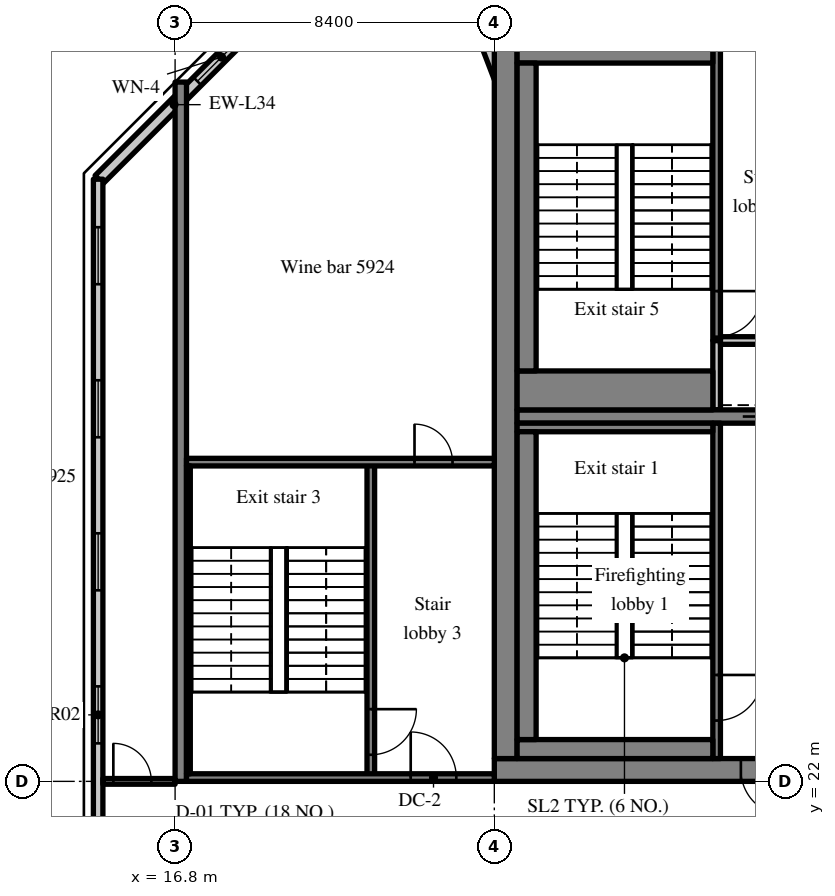
"""IFC4 building model, lengths in metres.
Left out: names, types, materials, properties, quantities, classifications, styles, units other than length and angle.
Written with IfcOpenShell. Run it as: python <this file> out.ifc"""

import sys

from ifc_helpers import new_model, si_unit, direction, frame, frame_2d, origin, place, context, subcontext, project, spatial, rectangle, extrude, source, transform, mapped, element, fill, save


model = new_model("IFC4")
c1 = context("Model", 3, precision=1e-05, world=origin(), true_north=direction((0.0, 1.0)))
c2 = subcontext(c1, "Body", "Model", "MODEL_VIEW")
j1 = project(units=[si_unit("LENGTHUNIT", "METRE"), si_unit("PLANEANGLEUNIT", "RADIAN")], contexts=[c1])
p1 = place(None, origin())
s1 = spatial("IfcSite", under=j1, at=p1, CompositionType="ELEMENT")
p2 = place(p1, origin())
s2 = spatial("IfcBuilding", under=s1, at=p2, CompositionType="ELEMENT")
p3 = place(p2, frame((0.0, 0.0, 245.2)))
s3 = spatial("IfcBuildingStorey", under=s2, at=p3, CompositionType="ELEMENT", Elevation=245.2)
m1 = source(origin(), c2, "Body", "SweptSolid", [
    extrude(rectangle(XDim=50.4, YDim=0.6, at=frame_2d((25.2, 0.0))), origin(), (0.0, 0.0, 1.0), 3.62),
])
p4 = place(p3, frame((25.2, 22.3, 0.0), z_axis=(0.0, 0.0, 1.0), x_axis=(1.0, 0.0, 0.0)))
e1 = element("IfcWall", 1, at=p4, inside=s3, PredefinedType="SHEAR", context=c2, shape_type="MappedRepresentation", body=[
    mapped(m1, transform((0.0, 0.0, 0.0), scale=1.0)),
])
m2 = source(origin(), c2, "Body", "SweptSolid", [
    extrude(rectangle(XDim=1.8, YDim=2.1, at=frame_2d((0.9, 1.05))), frame((0.0, 0.31, 0.0), z_axis=(0.0, -1.0, 0.0), x_axis=(1.0, 0.0, 0.0)), (0.0, 0.0, 1.0), 0.62),
])
p5 = place(p4, frame((15.9, 0.0, 0.0)))
e2 = element("IfcOpeningElement", 2, at=p5, cuts=e1, PredefinedType="OPENING", context=c2, shape_type="MappedRepresentation", body=[
    mapped(m2, transform((0.0, 0.0, 0.0), scale=1.0)),
])
m3 = source(origin(), c2, "Body", "SweptSolid", [
    extrude(rectangle(XDim=0.9, YDim=2.1, at=frame_2d((0.45, 1.05))), frame((0.0, 0.31, 0.0), z_axis=(0.0, -1.0, 0.0), x_axis=(1.0, 0.0, 0.0)), (0.0, 0.0, 1.0), 0.62),
])
p6 = place(p4, frame((9.687, 0.0, 0.0)))
e3 = element("IfcOpeningElement", 3, at=p6, cuts=e1, PredefinedType="OPENING", context=c2, shape_type="MappedRepresentation", body=[
    mapped(m3, transform((0.0, 0.0, 0.0), scale=1.0)),
])
p7 = place(p4, frame((21.513, 0.0, 0.0)))
e4 = element("IfcOpeningElement", 4, at=p7, cuts=e1, PredefinedType="OPENING", context=c2, shape_type="MappedRepresentation", body=[
    mapped(m3, transform((0.0, 0.0, 0.0), scale=1.0)),
])
p8 = place(p4, frame((32.7, 0.0, 0.0)))
e5 = element("IfcOpeningElement", 5, at=p8, cuts=e1, PredefinedType="OPENING", context=c2, shape_type="MappedRepresentation", body=[
    mapped(m2, transform((0.0, 0.0, 0.0), scale=1.0)),
])
m4 = source(origin(), c2, "Body", "SweptSolid", [
    extrude(rectangle(XDim=1.2, YDim=2.1, at=frame_2d((0.6, 1.05))), frame((0.0, 0.31, 0.0), z_axis=(0.0, -1.0, 0.0), x_axis=(1.0, 0.0, 0.0)), (0.0, 0.0, 1.0), 0.62),
])
p9 = place(p4, frame((6.488, 0.0, 0.0)))
e6 = element("IfcOpeningElement", 6, at=p9, cuts=e1, PredefinedType="OPENING", context=c2, shape_type="MappedRepresentation", body=[
    mapped(m4, transform((0.0, 0.0, 0.0), scale=1.0)),
])
p10 = place(p4, frame((47.925, 0.0, 0.0)))
e7 = element("IfcOpeningElement", 7, at=p10, cuts=e1, PredefinedType="OPENING", context=c2, shape_type="MappedRepresentation", body=[
    mapped(m4, transform((0.0, 0.0, 0.0), scale=1.0)),
])
m5 = source(origin(), c2, "Body", "SweptSolid", [
    extrude(rectangle(XDim=18.8, YDim=0.6, at=frame_2d((9.4, 0.0))), origin(), (0.0, 0.0, 1.0), 3.62),
])
p11 = place(p3, frame((25.5, 22.6, 0.0), z_axis=(0.0, 0.0, 1.0), x_axis=(0.0, 1.0, 0.0)))
e8 = element("IfcWall", 8, at=p11, inside=s3, PredefinedType="SHEAR", context=c2, shape_type="MappedRepresentation", body=[
    mapped(m5, transform((0.0, 0.0, 0.0), scale=1.0)),
])
m6 = source(origin(), c2, "Body", "SweptSolid", [
    extrude(rectangle(XDim=7.625, YDim=0.35, at=frame_2d((3.812, 0.0))), origin(), (0.0, 0.0, 1.0), 3.62),
])
p12 = place(p3, frame((25.8, 31.6, 0.0), z_axis=(0.0, 0.0, 1.0), x_axis=(1.0, 0.0, 0.0)))
e9 = element("IfcWall", 9, at=p12, inside=s3, PredefinedType="SHEAR", context=c2, shape_type="MappedRepresentation", body=[
    mapped(m6, transform((0.0, 0.0, 0.0), scale=1.0)),
])
m7 = source(origin(), c2, "Body", "SweptSolid", [
    extrude(rectangle(XDim=1.1, YDim=2.1, at=frame_2d((0.55, 1.05))), frame((0.0, 0.185, 0.0), z_axis=(0.0, -1.0, 0.0), x_axis=(1.0, 0.0, 0.0)), (0.0, 0.0, 1.0), 0.37),
])
p13 = place(p12, frame((5.938, 0.0, 0.0)))
e10 = element("IfcOpeningElement", 10, at=p13, cuts=e9, PredefinedType="OPENING", context=c2, shape_type="MappedRepresentation", body=[
    mapped(m7, transform((0.0, 0.0, 0.0), scale=1.0)),
])
m8 = source(origin(), c2, "Body", "SweptSolid", [
    extrude(rectangle(XDim=18.4, YDim=0.3, at=frame_2d((9.2, 0.0))), origin(), (0.0, 0.0, 1.0), 3.62),
])
p14 = place(p3, frame((16.95, 22.0, 0.0), z_axis=(0.0, 0.0, 1.0), x_axis=(0.0, 1.0, 0.0)))
e11 = element("IfcWall", 11, at=p14, inside=s3, PredefinedType="SHEAR", context=c2, shape_type="MappedRepresentation", body=[
    mapped(m8, transform((0.0, 0.0, 0.0), scale=1.0)),
])
m9 = source(origin(), c2, "Body", "SweptSolid", [
    extrude(rectangle(XDim=3.559, YDim=0.3, at=frame_2d((1.78, 0.0))), origin(), (0.0, 0.0, 1.0), 3.62),
])
p15 = place(p3, frame((25.55, 39.969, 0.0), z_axis=(0.0, 0.0, 1.0), x_axis=(-0.35779745313, 0.933799219604, 0.0)))
e12 = element("IfcWall", 12, at=p15, inside=s3, PredefinedType="SOLIDWALL", context=c2, shape_type="MappedRepresentation", body=[
    mapped(m9, transform((0.0, 0.0, 0.0), scale=1.0)),
])
m10 = source(origin(), c2, "Body", "SweptSolid", [
    extrude(rectangle(XDim=1.5, YDim=2.0, at=frame_2d((0.75, 1.0))), frame((0.0, 0.16, 0.0), z_axis=(0.0, -1.0, 0.0), x_axis=(1.0, 0.0, 0.0)), (0.0, 0.0, 1.0), 0.32),
])
p16 = place(p15, frame((1.903, 0.0, 0.9)))
e13 = element("IfcOpeningElement", 13, at=p16, cuts=e12, PredefinedType="OPENING", context=c2, shape_type="MappedRepresentation", body=[
    mapped(m10, transform((0.0, 0.0, 0.0), scale=1.0)),
])
m11 = source(origin(), c2, "Body", "SweptSolid", [
    extrude(rectangle(XDim=5.576, YDim=0.3, at=frame_2d((2.788, 0.0))), origin(), (0.0, 0.0, 1.0), 3.62),
])
p17 = place(p3, frame((18.743, 41.777, 0.0), z_axis=(0.0, 0.0, 1.0), x_axis=(-0.707106781187, -0.707106781187, 0.0)))
e14 = element("IfcWall", 14, at=p17, inside=s3, PredefinedType="SOLIDWALL", context=c2, shape_type="MappedRepresentation", body=[
    mapped(m11, transform((0.0, 0.0, 0.0), scale=1.0)),
])
m12 = source(origin(), c2, "Body", "SweptSolid", [
    extrude(rectangle(XDim=1.8, YDim=1.5, at=frame_2d((0.9, 0.75))), frame((0.0, 0.16, 0.0), z_axis=(0.0, -1.0, 0.0), x_axis=(1.0, 0.0, 0.0)), (0.0, 0.0, 1.0), 0.32),
])
p18 = place(p17, frame((0.118, 0.0, 0.9)))
e15 = element("IfcOpeningElement", 15, at=p18, cuts=e14, PredefinedType="OPENING", context=c2, shape_type="MappedRepresentation", body=[
    mapped(m12, transform((0.0, 0.0, 0.0), scale=1.0)),
])
m13 = source(origin(), c2, "Body", "SweptSolid", [
    extrude(rectangle(XDim=28.189, YDim=0.25, at=frame_2d((14.095, 0.0))), origin(), (0.0, 0.0, 1.0), 3.62),
])
p19 = place(p3, frame((14.775, 37.845, 0.0), z_axis=(0.0, 0.0, 1.0), x_axis=(0.0, -1.0, 0.0)))
e16 = element("IfcWall", 16, at=p19, inside=s3, PredefinedType="SOLIDWALL", context=c2, shape_type="MappedRepresentation", body=[
    mapped(m13, transform((0.0, 0.0, 0.0), scale=1.0)),
])
m14 = source(origin(), c2, "Body", "SweptSolid", [
    extrude(rectangle(XDim=1.5, YDim=1.5, at=frame_2d((0.75, 0.75))), frame((0.0, 0.135, 0.0), z_axis=(0.0, -1.0, 0.0), x_axis=(1.0, 0.0, 0.0)), (0.0, 0.0, 1.0), 0.27),
])
p20 = place(p19, frame((1.263, 0.0, 0.9)))
e17 = element("IfcOpeningElement", 17, at=p20, cuts=e16, PredefinedType="OPENING", context=c2, shape_type="MappedRepresentation", body=[
    mapped(m14, transform((0.0, 0.0, 0.0), scale=1.0)),
])
p21 = place(p19, frame((5.291, 0.0, 0.9)))
e18 = element("IfcOpeningElement", 18, at=p21, cuts=e16, PredefinedType="OPENING", context=c2, shape_type="MappedRepresentation", body=[
    mapped(m14, transform((0.0, 0.0, 0.0), scale=1.0)),
])
p22 = place(p19, frame((9.318, 0.0, 0.9)))
e19 = element("IfcOpeningElement", 19, at=p22, cuts=e16, PredefinedType="OPENING", context=c2, shape_type="MappedRepresentation", body=[
    mapped(m14, transform((0.0, 0.0, 0.0), scale=1.0)),
])
p23 = place(p19, frame((13.345, 0.0, 0.9)))
e20 = element("IfcOpeningElement", 20, at=p23, cuts=e16, PredefinedType="OPENING", context=c2, shape_type="MappedRepresentation", body=[
    mapped(m14, transform((0.0, 0.0, 0.0), scale=1.0)),
])
p24 = place(p19, frame((17.372, 0.0, 0.9)))
e21 = element("IfcOpeningElement", 21, at=p24, cuts=e16, PredefinedType="OPENING", context=c2, shape_type="MappedRepresentation", body=[
    mapped(m14, transform((0.0, 0.0, 0.0), scale=1.0)),
])
p25 = place(p19, frame((21.399, 0.0, 0.9)))
e22 = element("IfcOpeningElement", 22, at=p25, cuts=e16, PredefinedType="OPENING", context=c2, shape_type="MappedRepresentation", body=[
    mapped(m14, transform((0.0, 0.0, 0.0), scale=1.0)),
])
p26 = place(p19, frame((25.426, 0.0, 0.9)))
e23 = element("IfcOpeningElement", 23, at=p26, cuts=e16, PredefinedType="OPENING", context=c2, shape_type="MappedRepresentation", body=[
    mapped(m14, transform((0.0, 0.0, 0.0), scale=1.0)),
])
m15 = source(origin(), c2, "Body", "SweptSolid", [
    extrude(rectangle(XDim=8.825, YDim=0.2, at=frame_2d((4.413, 0.0))), origin(), (0.0, 0.0, 1.0), 3.62),
])
p27 = place(p3, frame((31.05, 22.6, 0.0), z_axis=(0.0, 0.0, 1.0), x_axis=(0.0, 1.0, 0.0)))
e24 = element("IfcWall", 24, at=p27, inside=s3, PredefinedType="SOLIDWALL", context=c2, shape_type="MappedRepresentation", body=[
    mapped(m15, transform((0.0, 0.0, 0.0), scale=1.0)),
])
m16 = source(origin(), c2, "Body", "SweptSolid", [
    extrude(rectangle(XDim=1.2, YDim=2.1, at=frame_2d((0.6, 1.05))), frame((0.0, 0.11, 0.0), z_axis=(0.0, -1.0, 0.0), x_axis=(1.0, 0.0, 0.0)), (0.0, 0.0, 1.0), 0.22),
])
p28 = place(p27, frame((1.0, 0.0, 0.0)))
e25 = element("IfcOpeningElement", 25, at=p28, cuts=e24, PredefinedType="OPENING", context=c2, shape_type="MappedRepresentation", body=[
    mapped(m16, transform((0.0, 0.0, 0.0), scale=1.0)),
])
m17 = source(origin(), c2, "Body", "SweptSolid", [
    extrude(rectangle(XDim=1.825, YDim=0.2, at=frame_2d((0.913, 0.0))), origin(), (0.0, 0.0, 1.0), 3.62),
])
p29 = place(p3, frame((31.05, 31.775, 0.0), z_axis=(0.0, 0.0, 1.0), x_axis=(0.0, 1.0, 0.0)))
e26 = element("IfcWall", 26, at=p29, inside=s3, PredefinedType="SOLIDWALL", context=c2, shape_type="MappedRepresentation", body=[
    mapped(m17, transform((0.0, 0.0, 0.0), scale=1.0)),
])
m18 = source(origin(), c2, "Body", "SweptSolid", [
    extrude(rectangle(XDim=2.275, YDim=0.2, at=frame_2d((1.138, 0.0))), origin(), (0.0, 0.0, 1.0), 3.62),
])
p30 = place(p3, frame((31.15, 33.6, 0.0), z_axis=(0.0, 0.0, 1.0), x_axis=(1.0, 0.0, 0.0)))
e27 = element("IfcWall", 27, at=p30, inside=s3, PredefinedType="SOLIDWALL", context=c2, shape_type="MappedRepresentation", body=[
    mapped(m18, transform((0.0, 0.0, 0.0), scale=1.0)),
])
m19 = source(origin(), c2, "Body", "SweptSolid", [
    extrude(rectangle(XDim=7.8, YDim=0.2, at=frame_2d((3.9, 0.0))), origin(), (0.0, 0.0, 1.0), 3.62),
])
p31 = place(p3, frame((31.05, 33.6, 0.0), z_axis=(0.0, 0.0, 1.0), x_axis=(0.0, 1.0, 0.0)))
e28 = element("IfcWall", 28, at=p31, inside=s3, PredefinedType="SOLIDWALL", context=c2, shape_type="MappedRepresentation", body=[
    mapped(m19, transform((0.0, 0.0, 0.0), scale=1.0)),
])
p32 = place(p31, frame((0.1, 0.0, 0.0)))
e29 = element("IfcOpeningElement", 29, at=p32, cuts=e28, PredefinedType="OPENING", context=c2, shape_type="MappedRepresentation", body=[
    mapped(m16, transform((0.0, 0.0, 0.0), scale=1.0)),
])
m20 = source(origin(), c2, "Body", "SweptSolid", [
    extrude(rectangle(XDim=8.3, YDim=0.2, at=frame_2d((4.15, 0.0))), origin(), (0.0, 0.0, 1.0), 3.62),
])
p33 = place(p3, frame((21.95, 22.1, 0.0), z_axis=(0.0, 0.0, 1.0), x_axis=(0.0, 1.0, 0.0)))
e30 = element("IfcWall", 30, at=p33, inside=s3, PredefinedType="SOLIDWALL", context=c2, shape_type="MappedRepresentation", body=[
    mapped(m20, transform((0.0, 0.0, 0.0), scale=1.0)),
])
p34 = place(p33, frame((0.6, 0.0, 0.0)))
e31 = element("IfcOpeningElement", 31, at=p34, cuts=e30, PredefinedType="OPENING", context=c2, shape_type="MappedRepresentation", body=[
    mapped(m16, transform((0.0, 0.0, 0.0), scale=1.0)),
])
m21 = source(origin(), c2, "Body", "SweptSolid", [
    extrude(rectangle(XDim=8.1, YDim=0.2, at=frame_2d((4.05, 0.0))), origin(), (0.0, 0.0, 1.0), 3.62),
])
p35 = place(p3, frame((17.1, 22.1, 0.0), z_axis=(0.0, 0.0, 1.0), x_axis=(1.0, 0.0, 0.0)))
e32 = element("IfcWall", 32, at=p35, inside=s3, PredefinedType="SOLIDWALL", context=c2, shape_type="MappedRepresentation", body=[
    mapped(m21, transform((0.0, 0.0, 0.0), scale=1.0)),
])
p36 = place(p35, frame((5.9, 0.0, 0.0)))
e33 = element("IfcOpeningElement", 33, at=p36, cuts=e32, PredefinedType="OPENING", context=c2, shape_type="MappedRepresentation", body=[
    mapped(m16, transform((0.0, 0.0, 0.0), scale=1.0)),
])
p37 = place(p3, frame((17.1, 30.4, 0.0), z_axis=(0.0, 0.0, 1.0), x_axis=(1.0, 0.0, 0.0)))
e34 = element("IfcWall", 34, at=p37, inside=s3, PredefinedType="SOLIDWALL", context=c2, shape_type="MappedRepresentation", body=[
    mapped(m21, transform((0.0, 0.0, 0.0), scale=1.0)),
])
m22 = source(origin(), c2, "Body", "SweptSolid", [
    extrude(rectangle(XDim=1.0, YDim=2.1, at=frame_2d((0.5, 1.05))), frame((0.0, 0.11, 0.0), z_axis=(0.0, -1.0, 0.0), x_axis=(1.0, 0.0, 0.0)), (0.0, 0.0, 1.0), 0.22),
])
p38 = place(p37, frame((6.0, 0.0, 0.0)))
e35 = element("IfcOpeningElement", 35, at=p38, cuts=e34, PredefinedType="OPENING", context=c2, shape_type="MappedRepresentation", body=[
    mapped(m22, transform((0.0, 0.0, 0.0), scale=1.0)),
])
m23 = source(origin(), c2, "Body", "SweptSolid", [
    extrude(rectangle(XDim=5.15, YDim=0.5, at=frame_2d((2.575, 0.0))), origin(), (0.0, 0.0, 1.0), 3.62),
])
p39 = place(p3, frame((25.8, 22.85, 0.0), z_axis=(0.0, 0.0, 1.0), x_axis=(1.0, 0.0, 0.0)))
e36 = element("IfcWall", 36, at=p39, inside=s3, PredefinedType="SOLIDWALL", context=c2, shape_type="MappedRepresentation", body=[
    mapped(m23, transform((0.0, 0.0, 0.0), scale=1.0)),
])
m24 = source(origin(), c2, "Body", "SweptSolid", [
    extrude(rectangle(XDim=5.15, YDim=0.225, at=frame_2d((2.575, 0.0))), origin(), (0.0, 0.0, 1.0), 3.62),
])
p40 = place(p3, frame((25.8, 31.312, 0.0), z_axis=(0.0, 0.0, 1.0), x_axis=(1.0, 0.0, 0.0)))
e37 = element("IfcWall", 37, at=p40, inside=s3, PredefinedType="SOLIDWALL", context=c2, shape_type="MappedRepresentation", body=[
    mapped(m24, transform((0.0, 0.0, 0.0), scale=1.0)),
])
m25 = source(origin(), c2, "Body", "SweptSolid", [
    extrude(rectangle(XDim=8.1, YDim=0.5, at=frame_2d((4.05, 0.0))), origin(), (0.0, 0.0, 1.0), 3.62),
])
p41 = place(p3, frame((26.05, 23.1, 0.0), z_axis=(0.0, 0.0, 1.0), x_axis=(0.0, 1.0, 0.0)))
e38 = element("IfcWall", 38, at=p41, inside=s3, PredefinedType="SOLIDWALL", context=c2, shape_type="MappedRepresentation", body=[
    mapped(m25, transform((0.0, 0.0, 0.0), scale=1.0)),
])
m26 = source(origin(), c2, "Body", "SweptSolid", [
    extrude(rectangle(XDim=8.1, YDim=0.1, at=frame_2d((4.05, 0.0))), origin(), (0.0, 0.0, 1.0), 3.62),
])
p42 = place(p3, frame((17.15, 22.2, 0.0), z_axis=(0.0, 0.0, 1.0), x_axis=(0.0, 1.0, 0.0)))
e39 = element("IfcWall", 39, at=p42, inside=s3, PredefinedType="SOLIDWALL", context=c2, shape_type="MappedRepresentation", body=[
    mapped(m26, transform((0.0, 0.0, 0.0), scale=1.0)),
])
p43 = place(p3, frame((25.8, 41.15, 0.0), z_axis=(0.0, 0.0, 1.0), x_axis=(1.0, 0.0, 0.0)))
e40 = element("IfcWall", 40, at=p43, inside=s3, PredefinedType="SOLIDWALL", context=c2, shape_type="MappedRepresentation", body=[
    mapped(m23, transform((0.0, 0.0, 0.0), scale=1.0)),
])
m27 = source(origin(), c2, "Body", "SweptSolid", [
    extrude(rectangle(XDim=5.15, YDim=1.025, at=frame_2d((2.575, 0.0))), origin(), (0.0, 0.0, 1.0), 3.62),
])
p44 = place(p3, frame((25.8, 32.287, 0.0), z_axis=(0.0, 0.0, 1.0), x_axis=(1.0, 0.0, 0.0)))
e41 = element("IfcWall", 41, at=p44, inside=s3, PredefinedType="SOLIDWALL", context=c2, shape_type="MappedRepresentation", body=[
    mapped(m27, transform((0.0, 0.0, 0.0), scale=1.0)),
])
p45 = place(p3, frame((26.05, 32.8, 0.0), z_axis=(0.0, 0.0, 1.0), x_axis=(0.0, 1.0, 0.0)))
e42 = element("IfcWall", 42, at=p45, inside=s3, PredefinedType="SOLIDWALL", context=c2, shape_type="MappedRepresentation", body=[
    mapped(m25, transform((0.0, 0.0, 0.0), scale=1.0)),
])
m28 = source(origin(), c2, "Body", "SweptSolid", [
    extrude(rectangle(XDim=1.9, YDim=0.15, at=frame_2d((0.95, 0.0))), origin(), (0.0, 0.0, 1.0), 2.92),
])
p46 = place(p3, frame((14.9, 22.0, 0.0), z_axis=(0.0, 0.0, 1.0), x_axis=(1.0, 0.0, 0.0)))
e43 = element("IfcWall", 43, at=p46, inside=s3, PredefinedType="PARTITIONING", context=c2, shape_type="MappedRepresentation", body=[
    mapped(m28, transform((0.0, 0.0, 0.0), scale=1.0)),
])
m29 = source(origin(), c2, "Body", "SweptSolid", [
    extrude(rectangle(XDim=1.0, YDim=2.1, at=frame_2d((0.5, 1.05))), frame((0.0, 0.085, 0.0), z_axis=(0.0, -1.0, 0.0), x_axis=(1.0, 0.0, 0.0)), (0.0, 0.0, 1.0), 0.17),
])
p47 = place(p46, frame((0.275, 0.0, 0.0)))
e44 = element("IfcOpeningElement", 44, at=p47, cuts=e43, PredefinedType="OPENING", context=c2, shape_type="MappedRepresentation", body=[
    mapped(m29, transform((0.0, 0.0, 0.0), scale=1.0)),
])
m30 = source(origin(), c2, "Body", "SweptSolid", [
    extrude(rectangle(XDim=1.8, YDim=1.5, at=frame_2d((0.9, 0.75))), frame((0.0, 0.03, 0.0), z_axis=(0.0, -1.0, 0.0), x_axis=(1.0, 0.0, 0.0)), (0.0, 0.0, 1.0), 0.06),
])
p48 = place(p18, origin())
e45 = element("IfcWindow", 45, at=p48, inside=s3, PartitioningType="SINGLE_PANEL", PredefinedType="WINDOW", context=c2, shape_type="MappedRepresentation", body=[
    mapped(m30, transform((0.0, 0.0, 0.0), scale=1.0)),
])
fill(e15, e45)
m31 = source(origin(), c2, "Body", "SweptSolid", [
    extrude(rectangle(XDim=1.5, YDim=1.5, at=frame_2d((0.75, 0.75))), frame((0.0, 0.03, 0.0), z_axis=(0.0, -1.0, 0.0), x_axis=(1.0, 0.0, 0.0)), (0.0, 0.0, 1.0), 0.06),
])
p49 = place(p20, origin())
e46 = element("IfcWindow", 46, at=p49, inside=s3, PartitioningType="SINGLE_PANEL", PredefinedType="WINDOW", context=c2, shape_type="MappedRepresentation", body=[
    mapped(m31, transform((0.0, 0.0, 0.0), scale=1.0)),
])
fill(e17, e46)
p50 = place(p21, origin())
e47 = element("IfcWindow", 47, at=p50, inside=s3, PartitioningType="SINGLE_PANEL", PredefinedType="WINDOW", context=c2, shape_type="MappedRepresentation", body=[
    mapped(m31, transform((0.0, 0.0, 0.0), scale=1.0)),
])
fill(e18, e47)
p51 = place(p22, origin())
e48 = element("IfcWindow", 48, at=p51, inside=s3, PartitioningType="SINGLE_PANEL", PredefinedType="WINDOW", context=c2, shape_type="MappedRepresentation", body=[
    mapped(m31, transform((0.0, 0.0, 0.0), scale=1.0)),
])
fill(e19, e48)
p52 = place(p23, origin())
e49 = element("IfcWindow", 49, at=p52, inside=s3, PartitioningType="SINGLE_PANEL", PredefinedType="WINDOW", context=c2, shape_type="MappedRepresentation", body=[
    mapped(m31, transform((0.0, 0.0, 0.0), scale=1.0)),
])
fill(e20, e49)
m32 = source(origin(), c2, "Body", "SweptSolid", [
    extrude(rectangle(XDim=1.2, YDim=2.1, at=frame_2d((0.6, 1.05))), frame((0.0, 0.025, 0.0), z_axis=(0.0, -1.0, 0.0), x_axis=(1.0, 0.0, 0.0)), (0.0, 0.0, 1.0), 0.05),
])
p53 = place(p28, origin())
e50 = element("IfcDoor", 50, at=p53, inside=s3, OperationType="SINGLE_SWING_RIGHT", PredefinedType="DOOR", context=c2, shape_type="MappedRepresentation", body=[
    mapped(m32, transform((0.0, 0.0, 0.0), scale=1.0)),
])
fill(e25, e50)
m33 = source(origin(), c2, "Body", "SweptSolid", [
    extrude(rectangle(XDim=1.2, YDim=2.1, at=frame_2d((0.6, 1.05))), frame((0.0, 0.225, 0.0), z_axis=(0.0, -1.0, 0.0), x_axis=(1.0, 0.0, 0.0)), (0.0, 0.0, 1.0), 0.05),
])
p54 = place(p9, origin())
e51 = element("IfcDoor", 51, at=p54, inside=s3, OperationType="SINGLE_SWING_RIGHT", PredefinedType="DOOR", context=c2, shape_type="MappedRepresentation", body=[
    mapped(m33, transform((0.0, 0.0, 0.0), scale=1.0)),
])
fill(e6, e51)
m34 = source(origin(), c2, "Body", "SweptSolid", [
    extrude(rectangle(XDim=1.1, YDim=2.1, at=frame_2d((0.55, 1.05))), frame((0.0, 0.025, 0.0), z_axis=(0.0, -1.0, 0.0), x_axis=(1.0, 0.0, 0.0)), (0.0, 0.0, 1.0), 0.05),
])
p55 = place(p13, origin())
e52 = element("IfcDoor", 52, at=p55, inside=s3, OperationType="SLIDING_TO_RIGHT", PredefinedType="DOOR", context=c2, shape_type="MappedRepresentation", body=[
    mapped(m34, transform((0.0, 0.0, 0.0), scale=1.0)),
])
fill(e10, e52)
p56 = place(p32, origin())
e53 = element("IfcDoor", 53, at=p56, inside=s3, OperationType="SINGLE_SWING_RIGHT", PredefinedType="DOOR", context=c2, shape_type="MappedRepresentation", body=[
    mapped(m32, transform((0.0, 0.0, 0.0), scale=1.0)),
])
fill(e29, e53)
p57 = place(p34, origin())
e54 = element("IfcDoor", 54, at=p57, inside=s3, OperationType="SINGLE_SWING_RIGHT", PredefinedType="DOOR", context=c2, shape_type="MappedRepresentation", body=[
    mapped(m32, transform((0.0, 0.0, 0.0), scale=1.0)),
])
fill(e31, e54)
p58 = place(p36, origin())
e55 = element("IfcDoor", 55, at=p58, inside=s3, OperationType="SINGLE_SWING_LEFT", PredefinedType="DOOR", context=c2, shape_type="MappedRepresentation", body=[
    mapped(m32, transform((0.0, 0.0, 0.0), scale=1.0)),
])
fill(e33, e55)
m35 = source(origin(), c2, "Body", "SweptSolid", [
    extrude(rectangle(XDim=1.0, YDim=2.1, at=frame_2d((0.5, 1.05))), frame((0.0, 0.025, 0.0), z_axis=(0.0, -1.0, 0.0), x_axis=(1.0, 0.0, 0.0)), (0.0, 0.0, 1.0), 0.05),
])
p59 = place(p38, origin())
e56 = element("IfcDoor", 56, at=p59, inside=s3, OperationType="SINGLE_SWING_LEFT", PredefinedType="DOOR", context=c2, shape_type="MappedRepresentation", body=[
    mapped(m35, transform((0.0, 0.0, 0.0), scale=1.0)),
])
fill(e35, e56)
p60 = place(p47, origin())
e57 = element("IfcDoor", 57, at=p60, inside=s3, OperationType="SINGLE_SWING_LEFT", PredefinedType="DOOR", context=c2, shape_type="MappedRepresentation", body=[
    mapped(m35, transform((0.0, 0.0, 0.0), scale=1.0)),
])
fill(e44, e57)
save(model, sys.argv[1])
